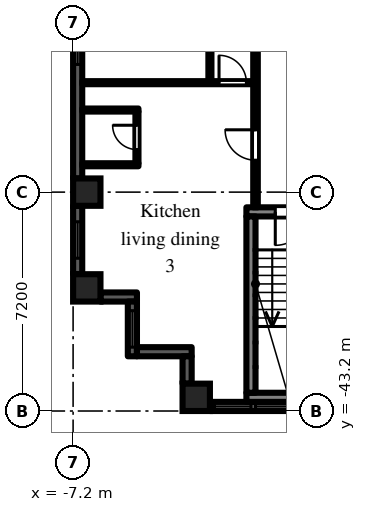
"""IFC4 building model, lengths in metres.
Left out: names, types, materials, properties, quantities, classifications, styles, units other than length and angle.
Written with IfcOpenShell. Run it as: python <this file> out.ifc"""

import sys

from ifc_helpers import new_model, si_unit, direction, frame, frame_2d, origin, origin_2d, place, context, subcontext, project, spatial, rectangle, extrude, element, fill, save


model = new_model("IFC4")
c1 = context("Model", 3, precision=1e-05, world=origin(), true_north=direction((0.0, 1.0)))
c2 = subcontext(c1, "Body", "Model", "MODEL_VIEW")
j1 = project(units=[si_unit("LENGTHUNIT", "METRE"), si_unit("PLANEANGLEUNIT", "RADIAN")], contexts=[c1])
p1 = place(None, origin())
s1 = spatial("IfcSite", under=j1, at=p1, CompositionType="ELEMENT")
p2 = place(p1, origin())
s2 = spatial("IfcBuilding", under=s1, at=p2, CompositionType="ELEMENT")
p3 = place(p2, frame((0.0, 0.0, 53.7)))
s3 = spatial("IfcBuildingStorey", under=s2, at=p3, CompositionType="ELEMENT", Elevation=53.7)
for number, where, z_axis, x_axis in (
    (1, (-6.75, -39.15, 0.0), (0.0, 0.0, 1.0), (1.0, 0.0, 0.0)),
    (2, (-6.75, -36.0, 0.0), (0.0, 0.0, 1.0), (1.0, 0.0, 0.0)),
    (3, (-3.15, -42.75, 0.0), (0.0, 0.0, 1.0), (1.0, 0.0, 0.0)),
):
    element("IfcColumn", number, at=place(p3, frame(where, z_axis=z_axis, x_axis=x_axis)), inside=s3, PredefinedType="COLUMN", context=c2, shape_type="SweptSolid", body=[
        extrude(rectangle(XDim=0.9, YDim=0.9, at=origin_2d()), origin(), (0.0, 0.0, 1.0), 3.0),
    ])
p4 = place(p3, frame((-7.05, -29.25, 0.0), z_axis=(0.0, 0.0, 1.0), x_axis=(0.0, -1.0, 0.0)))
e4 = element("IfcWall", 4, at=p4, inside=s3, PredefinedType="SOLIDWALL", context=c2, shape_type="SweptSolid", body=[
    extrude(rectangle(XDim=6.3, YDim=0.3, at=frame_2d((3.15, 0.0))), origin(), (0.0, 0.0, 1.0), 2.1),
])
p5 = place(p4, frame((0.15, 0.0, 0.2)))
e5 = element("IfcOpeningElement", 5, at=p5, cuts=e4, PredefinedType="OPENING", context=c2, shape_type="SweptSolid", body=[
    extrude(rectangle(XDim=2.4, YDim=1.85, at=frame_2d((1.2, 0.925))), frame((0.0, 0.16, 0.0), z_axis=(0.0, -1.0, 0.0), x_axis=(1.0, 0.0, 0.0)), (0.0, 0.0, 1.0), 0.32),
])
p6 = place(p3, frame((-7.05, -36.45, 0.0), z_axis=(0.0, 0.0, 1.0), x_axis=(0.0, -1.0, 0.0)))
e6 = element("IfcWall", 6, at=p6, inside=s3, PredefinedType="SOLIDWALL", context=c2, shape_type="SweptSolid", body=[
    extrude(rectangle(XDim=2.25, YDim=0.3, at=frame_2d((1.125, 0.0))), origin(), (0.0, 0.0, 1.0), 2.1),
])
p7 = place(p6, frame((0.525, 0.0, 0.2)))
e7 = element("IfcOpeningElement", 7, at=p7, cuts=e6, PredefinedType="OPENING", context=c2, shape_type="SweptSolid", body=[
    extrude(rectangle(XDim=1.2, YDim=1.85, at=frame_2d((0.6, 0.925))), frame((0.0, 0.16, 0.0), z_axis=(0.0, -1.0, 0.0), x_axis=(1.0, 0.0, 0.0)), (0.0, 0.0, 1.0), 0.32),
])
p8 = place(p3, frame((-6.3, -39.45, 0.0), z_axis=(0.0, 0.0, 1.0), x_axis=(1.0, 0.0, 0.0)))
e8 = element("IfcWall", 8, at=p8, inside=s3, PredefinedType="SOLIDWALL", context=c2, shape_type="SweptSolid", body=[
    extrude(rectangle(XDim=1.2, YDim=0.3, at=frame_2d((0.6, 0.0))), origin(), (0.0, 0.0, 1.0), 2.575),
])
p9 = place(p3, frame((-5.25, -39.6, 0.0), z_axis=(0.0, 0.0, 1.0), x_axis=(0.0, -1.0, 0.0)))
e9 = element("IfcWall", 9, at=p9, inside=s3, PredefinedType="SOLIDWALL", context=c2, shape_type="SweptSolid", body=[
    extrude(rectangle(XDim=1.8, YDim=0.3, at=frame_2d((0.9, 0.0))), origin(), (0.0, 0.0, 1.0), 2.575),
])
p10 = place(p9, frame((0.3, 0.0, 0.2)))
e10 = element("IfcOpeningElement", 10, at=p10, cuts=e9, PredefinedType="OPENING", context=c2, shape_type="SweptSolid", body=[
    extrude(rectangle(XDim=1.2, YDim=1.85, at=frame_2d((0.6, 0.925))), frame((0.0, 0.16, 0.0), z_axis=(0.0, -1.0, 0.0), x_axis=(1.0, 0.0, 0.0)), (0.0, 0.0, 1.0), 0.32),
])
p11 = place(p3, frame((-5.1, -41.25, 0.0), z_axis=(0.0, 0.0, 1.0), x_axis=(1.0, 0.0, 0.0)))
e11 = element("IfcWall", 11, at=p11, inside=s3, PredefinedType="SOLIDWALL", context=c2, shape_type="SweptSolid", body=[
    extrude(rectangle(XDim=1.8, YDim=0.3, at=frame_2d((0.9, 0.0))), origin(), (0.0, 0.0, 1.0), 2.575),
])
p12 = place(p3, frame((-3.45, -41.4, 0.0), z_axis=(0.0, 0.0, 1.0), x_axis=(0.0, -1.0, 0.0)))
e12 = element("IfcWall", 12, at=p12, inside=s3, PredefinedType="SOLIDWALL", context=c2, shape_type="SweptSolid", body=[
    extrude(rectangle(XDim=0.9, YDim=0.3, at=frame_2d((0.45, 0.0))), origin(), (0.0, 0.0, 1.0), 2.575),
])
p13 = place(p3, frame((-2.7, -43.05, 0.0), z_axis=(0.0, 0.0, 1.0), x_axis=(1.0, 0.0, 0.0)))
e13 = element("IfcWall", 13, at=p13, inside=s3, PredefinedType="SOLIDWALL", context=c2, shape_type="SweptSolid", body=[
    extrude(rectangle(XDim=5.4, YDim=0.3, at=frame_2d((2.7, 0.0))), origin(), (0.0, 0.0, 1.0), 2.1),
])
p14 = place(p13, frame((1.5, 0.0, 0.2)))
e14 = element("IfcOpeningElement", 14, at=p14, cuts=e13, PredefinedType="OPENING", context=c2, shape_type="SweptSolid", body=[
    extrude(rectangle(XDim=2.4, YDim=1.85, at=frame_2d((1.2, 0.925))), frame((0.0, 0.16, 0.0), z_axis=(0.0, -1.0, 0.0), x_axis=(1.0, 0.0, 0.0)), (0.0, 0.0, 1.0), 0.32),
])
p15 = place(p13, frame((0.15, 0.0, 0.2)))
e15 = element("IfcOpeningElement", 15, at=p15, cuts=e13, PredefinedType="OPENING", context=c2, shape_type="SweptSolid", body=[
    extrude(rectangle(XDim=1.2, YDim=1.85, at=frame_2d((0.6, 0.925))), frame((0.0, 0.16, 0.0), z_axis=(0.0, -1.0, 0.0), x_axis=(1.0, 0.0, 0.0)), (0.0, 0.0, 1.0), 0.32),
])
p16 = place(p13, frame((4.05, 0.0, 0.2)))
e16 = element("IfcOpeningElement", 16, at=p16, cuts=e13, PredefinedType="OPENING", context=c2, shape_type="SweptSolid", body=[
    extrude(rectangle(XDim=1.2, YDim=1.85, at=frame_2d((0.6, 0.925))), frame((0.0, 0.16, 0.0), z_axis=(0.0, -1.0, 0.0), x_axis=(1.0, 0.0, 0.0)), (0.0, 0.0, 1.0), 0.32),
])
p17 = place(p3, frame((-1.5, -36.65, 0.0), z_axis=(0.0, 0.0, 1.0), x_axis=(1.0, 0.0, 0.0)))
e17 = element("IfcWall", 17, at=p17, inside=s3, PredefinedType="SHEAR", context=c2, shape_type="SweptSolid", body=[
    extrude(rectangle(XDim=3.0, YDim=0.3, at=frame_2d((1.5, 0.0))), origin(), (0.0, 0.0, 1.0), 2.575),
])
p18 = place(p17, frame((0.95, 0.0, 0.0)))
e18 = element("IfcOpeningElement", 18, at=p18, cuts=e17, PredefinedType="OPENING", context=c2, shape_type="SweptSolid", body=[
    extrude(rectangle(XDim=1.1, YDim=2.1, at=frame_2d((0.55, 1.05))), frame((0.0, 0.16, 0.0), z_axis=(0.0, -1.0, 0.0), x_axis=(1.0, 0.0, 0.0)), (0.0, 0.0, 1.0), 0.32),
])
p19 = place(p3, frame((-1.5, -42.75, 0.0), z_axis=(0.0, 0.0, 1.0), x_axis=(1.0, 0.0, 0.0)))
e19 = element("IfcWall", 19, at=p19, inside=s3, PredefinedType="SHEAR", context=c2, shape_type="SweptSolid", body=[
    extrude(rectangle(XDim=3.0, YDim=0.3, at=frame_2d((1.5, 0.0))), origin(), (0.0, 0.0, 1.0), 2.575),
])
p20 = place(p3, frame((-1.35, -36.8, 0.0), z_axis=(0.0, 0.0, 1.0), x_axis=(0.0, -1.0, 0.0)))
e20 = element("IfcWall", 20, at=p20, inside=s3, PredefinedType="SHEAR", context=c2, shape_type="SweptSolid", body=[
    extrude(rectangle(XDim=5.8, YDim=0.3, at=frame_2d((2.9, 0.0))), origin(), (0.0, 0.0, 1.0), 2.575),
])
for number, where, z_axis, x_axis in (
    (21, (-6.9, -35.1, 0.0), (0.0, 0.0, 1.0), (1.0, 0.0, 0.0)),
    (22, (-6.9, -33.3, 0.0), (0.0, 0.0, 1.0), (1.0, 0.0, 0.0)),
):
    element("IfcWall", number, at=place(p3, frame(where, z_axis=z_axis, x_axis=x_axis)), inside=s3, PredefinedType="PARTITIONING", context=c2, shape_type="SweptSolid", body=[
        extrude(rectangle(XDim=1.85, YDim=0.1, at=frame_2d((0.925, 0.0))), origin(), (0.0, 0.0, 1.0), 2.575),
    ])
p21 = place(p3, frame((-6.9, -32.4, 0.0), z_axis=(0.0, 0.0, 1.0), x_axis=(1.0, 0.0, 0.0)))
e23 = element("IfcWall", 23, at=p21, inside=s3, PredefinedType="PARTITIONING", context=c2, shape_type="SweptSolid", body=[
    extrude(rectangle(XDim=5.625, YDim=0.1, at=frame_2d((2.812, 0.0))), origin(), (0.0, 0.0, 1.0), 2.575),
])
p22 = place(p21, frame((4.5, 0.0, 0.0)))
e24 = element("IfcOpeningElement", 24, at=p22, cuts=e23, PredefinedType="OPENING", context=c2, shape_type="SweptSolid", body=[
    extrude(rectangle(XDim=0.9, YDim=2.1, at=frame_2d((0.45, 1.05))), frame((0.0, 0.06, 0.0), z_axis=(0.0, -1.0, 0.0), x_axis=(1.0, 0.0, 0.0)), (0.0, 0.0, 1.0), 0.12),
])
p23 = place(p3, frame((-5.1, -35.05, 0.0), z_axis=(0.0, 0.0, 1.0), x_axis=(0.0, 1.0, 0.0)))
e25 = element("IfcWall", 25, at=p23, inside=s3, PredefinedType="PARTITIONING", context=c2, shape_type="SweptSolid", body=[
    extrude(rectangle(XDim=1.7, YDim=0.1, at=frame_2d((0.85, 0.0))), origin(), (0.0, 0.0, 1.0), 2.575),
])
p24 = place(p23, frame((0.45, 0.0, 0.0)))
e26 = element("IfcOpeningElement", 26, at=p24, cuts=e25, PredefinedType="OPENING", context=c2, shape_type="SweptSolid", body=[
    extrude(rectangle(XDim=0.8, YDim=2.1, at=frame_2d((0.4, 1.05))), frame((0.0, 0.06, 0.0), z_axis=(0.0, -1.0, 0.0), x_axis=(1.0, 0.0, 0.0)), (0.0, 0.0, 1.0), 0.12),
])
p25 = place(p3, frame((-2.7, -32.35, 0.0), z_axis=(0.0, 0.0, 1.0), x_axis=(0.0, 1.0, 0.0)))
e27 = element("IfcWall", 27, at=p25, inside=s3, PredefinedType="PARTITIONING", context=c2, shape_type="SweptSolid", body=[
    extrude(rectangle(XDim=14.25, YDim=0.1, at=frame_2d((7.125, 0.0))), origin(), (0.0, 0.0, 1.0), 2.575),
])
p26 = place(p25, frame((3.28, 0.0, 0.0)))
e28 = element("IfcOpeningElement", 28, at=p26, cuts=e27, PredefinedType="OPENING", context=c2, shape_type="SweptSolid", body=[
    extrude(rectangle(XDim=0.9, YDim=2.1, at=frame_2d((0.45, 1.05))), frame((0.0, 0.06, 0.0), z_axis=(0.0, -1.0, 0.0), x_axis=(1.0, 0.0, 0.0)), (0.0, 0.0, 1.0), 0.12),
])
p27 = place(p25, frame((10.12, 0.0, 0.0)))
e29 = element("IfcOpeningElement", 29, at=p27, cuts=e27, PredefinedType="OPENING", context=c2, shape_type="SweptSolid", body=[
    extrude(rectangle(XDim=0.9, YDim=2.1, at=frame_2d((0.45, 1.05))), frame((0.0, 0.06, 0.0), z_axis=(0.0, -1.0, 0.0), x_axis=(1.0, 0.0, 0.0)), (0.0, 0.0, 1.0), 0.12),
])
p28 = place(p3, frame((-1.2, -36.5, 0.0), z_axis=(0.0, 0.0, 1.0), x_axis=(0.0, 1.0, 0.0)))
e30 = element("IfcWall", 30, at=p28, inside=s3, PredefinedType="PARTITIONING", context=c2, shape_type="SweptSolid", body=[
    extrude(rectangle(XDim=35.225, YDim=0.15, at=frame_2d((17.613, 0.0))), origin(), (0.0, 0.0, 1.0), 2.575),
])
p29 = place(p28, frame((31.85, 0.0, 0.0)))
e31 = element("IfcOpeningElement", 31, at=p29, cuts=e30, PredefinedType="OPENING", context=c2, shape_type="SweptSolid", body=[
    extrude(rectangle(XDim=0.9, YDim=2.1, at=frame_2d((0.45, 1.05))), frame((0.0, 0.085, 0.0), z_axis=(0.0, -1.0, 0.0), x_axis=(1.0, 0.0, 0.0)), (0.0, 0.0, 1.0), 0.17),
])
p30 = place(p28, frame((23.05, 0.0, 0.0)))
e32 = element("IfcOpeningElement", 32, at=p30, cuts=e30, PredefinedType="OPENING", context=c2, shape_type="SweptSolid", body=[
    extrude(rectangle(XDim=0.9, YDim=2.1, at=frame_2d((0.45, 1.05))), frame((0.0, 0.085, 0.0), z_axis=(0.0, -1.0, 0.0), x_axis=(1.0, 0.0, 0.0)), (0.0, 0.0, 1.0), 0.17),
])
p31 = place(p28, frame((26.65, 0.0, 0.0)))
e33 = element("IfcOpeningElement", 33, at=p31, cuts=e30, PredefinedType="OPENING", context=c2, shape_type="SweptSolid", body=[
    extrude(rectangle(XDim=0.9, YDim=2.1, at=frame_2d((0.45, 1.05))), frame((0.0, 0.085, 0.0), z_axis=(0.0, -1.0, 0.0), x_axis=(1.0, 0.0, 0.0)), (0.0, 0.0, 1.0), 0.17),
])
p32 = place(p28, frame((20.9, 0.0, 0.0)))
e34 = element("IfcOpeningElement", 34, at=p32, cuts=e30, PredefinedType="OPENING", context=c2, shape_type="SweptSolid", body=[
    extrude(rectangle(XDim=1.0, YDim=2.1, at=frame_2d((0.5, 1.05))), frame((0.0, 0.085, 0.0), z_axis=(0.0, -1.0, 0.0), x_axis=(1.0, 0.0, 0.0)), (0.0, 0.0, 1.0), 0.17),
])
p33 = place(p28, frame((1.55, 0.0, 0.0)))
e35 = element("IfcOpeningElement", 35, at=p33, cuts=e30, PredefinedType="OPENING", context=c2, shape_type="SweptSolid", body=[
    extrude(rectangle(XDim=1.0, YDim=2.1, at=frame_2d((0.5, 1.05))), frame((0.0, 0.085, 0.0), z_axis=(0.0, -1.0, 0.0), x_axis=(1.0, 0.0, 0.0)), (0.0, 0.0, 1.0), 0.17),
])
p34 = place(p5, origin())
e36 = element("IfcWindow", 36, at=p34, inside=s3, PartitioningType="SINGLE_PANEL", PredefinedType="WINDOW", context=c2, shape_type="SweptSolid", body=[
    extrude(rectangle(XDim=2.4, YDim=1.85, at=frame_2d((1.2, 0.925))), frame((0.0, 0.03, 0.0), z_axis=(0.0, -1.0, 0.0), x_axis=(1.0, 0.0, 0.0)), (0.0, 0.0, 1.0), 0.06),
])
fill(e5, e36)
p35 = place(p7, origin())
e37 = element("IfcWindow", 37, at=p35, inside=s3, PartitioningType="SINGLE_PANEL", PredefinedType="WINDOW", context=c2, shape_type="SweptSolid", body=[
    extrude(rectangle(XDim=1.2, YDim=1.85, at=frame_2d((0.6, 0.925))), frame((0.0, 0.03, 0.0), z_axis=(0.0, -1.0, 0.0), x_axis=(1.0, 0.0, 0.0)), (0.0, 0.0, 1.0), 0.06),
])
fill(e7, e37)
p36 = place(p10, origin())
e38 = element("IfcWindow", 38, at=p36, inside=s3, PartitioningType="SINGLE_PANEL", PredefinedType="WINDOW", context=c2, shape_type="SweptSolid", body=[
    extrude(rectangle(XDim=1.2, YDim=1.85, at=frame_2d((0.6, 0.925))), frame((0.0, 0.03, 0.0), z_axis=(0.0, -1.0, 0.0), x_axis=(1.0, 0.0, 0.0)), (0.0, 0.0, 1.0), 0.06),
])
fill(e10, e38)
p37 = place(p14, origin())
e39 = element("IfcWindow", 39, at=p37, inside=s3, PartitioningType="SINGLE_PANEL", PredefinedType="WINDOW", context=c2, shape_type="SweptSolid", body=[
    extrude(rectangle(XDim=2.4, YDim=1.85, at=frame_2d((1.2, 0.925))), frame((0.0, 0.03, 0.0), z_axis=(0.0, -1.0, 0.0), x_axis=(1.0, 0.0, 0.0)), (0.0, 0.0, 1.0), 0.06),
])
fill(e14, e39)
p38 = place(p15, origin())
e40 = element("IfcWindow", 40, at=p38, inside=s3, PartitioningType="SINGLE_PANEL", PredefinedType="WINDOW", context=c2, shape_type="SweptSolid", body=[
    extrude(rectangle(XDim=1.2, YDim=1.85, at=frame_2d((0.6, 0.925))), frame((0.0, 0.03, 0.0), z_axis=(0.0, -1.0, 0.0), x_axis=(1.0, 0.0, 0.0)), (0.0, 0.0, 1.0), 0.06),
])
fill(e15, e40)
p39 = place(p18, frame((1.1, 0.0, 0.0), z_axis=(0.0, 0.0, 1.0), x_axis=(-1.0, 0.0, 0.0)))
e41 = element("IfcDoor", 41, at=p39, inside=s3, OperationType="SINGLE_SWING_RIGHT", PredefinedType="DOOR", context=c2, shape_type="SweptSolid", body=[
    extrude(rectangle(XDim=1.1, YDim=2.1, at=frame_2d((0.55, 1.05))), frame((0.0, 0.025, 0.0), z_axis=(0.0, -1.0, 0.0), x_axis=(1.0, 0.0, 0.0)), (0.0, 0.0, 1.0), 0.05),
])
fill(e18, e41)
p40 = place(p24, origin())
e42 = element("IfcDoor", 42, at=p40, inside=s3, OperationType="SINGLE_SWING_RIGHT", PredefinedType="DOOR", context=c2, shape_type="SweptSolid", body=[
    extrude(rectangle(XDim=0.8, YDim=2.1, at=frame_2d((0.4, 1.05))), frame((0.0, 0.025, 0.0), z_axis=(0.0, -1.0, 0.0), x_axis=(1.0, 0.0, 0.0)), (0.0, 0.0, 1.0), 0.05),
])
fill(e26, e42)
p41 = place(p33, origin())
e43 = element("IfcDoor", 43, at=p41, inside=s3, OperationType="SINGLE_SWING_RIGHT", PredefinedType="DOOR", context=c2, shape_type="SweptSolid", body=[
    extrude(rectangle(XDim=1.0, YDim=2.1, at=frame_2d((0.5, 1.05))), frame((0.0, 0.025, 0.0), z_axis=(0.0, -1.0, 0.0), x_axis=(1.0, 0.0, 0.0)), (0.0, 0.0, 1.0), 0.05),
])
fill(e35, e43)
p42 = place(p22, origin())
e44 = element("IfcDoor", 44, at=p42, inside=s3, OperationType="SINGLE_SWING_LEFT", PredefinedType="DOOR", context=c2, shape_type="SweptSolid", body=[
    extrude(rectangle(XDim=0.9, YDim=2.1, at=frame_2d((0.45, 1.05))), frame((0.0, 0.025, 0.0), z_axis=(0.0, -1.0, 0.0), x_axis=(1.0, 0.0, 0.0)), (0.0, 0.0, 1.0), 0.05),
])
fill(e24, e44)
save(model, sys.argv[1])
